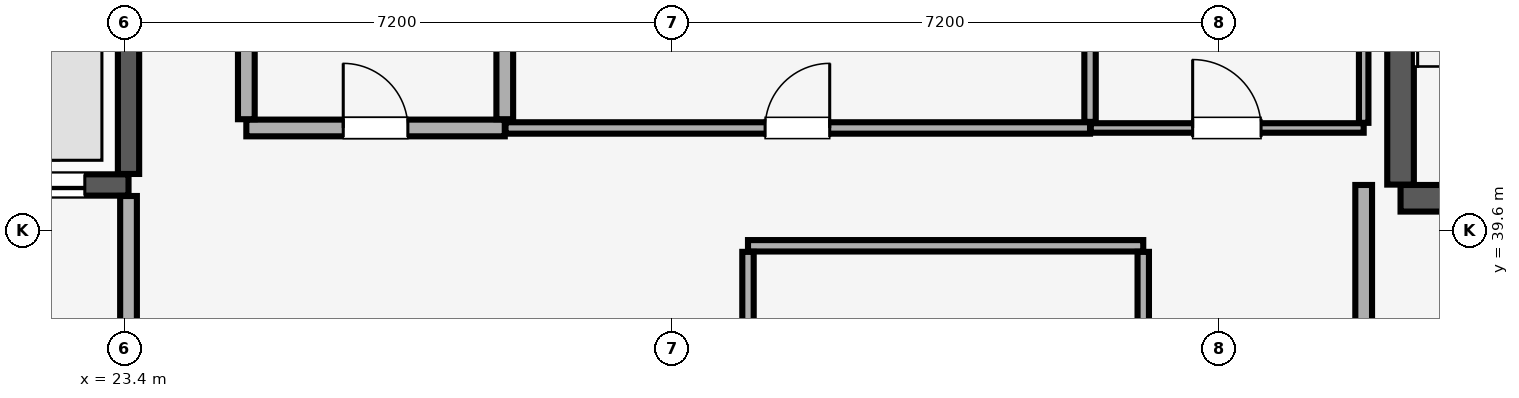
"""IFC4 building model, lengths in metres.
Left out: names, types, materials, properties, quantities, classifications, styles, units other than length and angle.
Written with IfcOpenShell. Run it as: python <this file> out.ifc"""

import sys

from ifc_helpers import new_model, si_unit, direction, frame, frame_2d, origin, place, context, subcontext, project, spatial, rectangle, extrude, element, fill, save


model = new_model("IFC4")
c1 = context("Model", 3, precision=1e-05, world=origin(), true_north=direction((0.0, 1.0)))
c2 = subcontext(c1, "Body", "Model", "MODEL_VIEW")
j1 = project(units=[si_unit("LENGTHUNIT", "METRE"), si_unit("PLANEANGLEUNIT", "RADIAN")], contexts=[c1])
p1 = place(None, origin())
s1 = spatial("IfcSite", under=j1, at=p1, CompositionType="ELEMENT")
p2 = place(p1, origin())
s2 = spatial("IfcBuilding", under=s1, at=p2, CompositionType="ELEMENT")
p3 = place(p2, frame((0.0, 0.0, 276.55)))
s3 = spatial("IfcBuildingStorey", under=s2, at=p3, CompositionType="ELEMENT", Elevation=276.55)
p4 = place(p3, frame((40.185, 40.025, 0.0), z_axis=(0.0, 0.0, 1.0), x_axis=(1.0, 0.0, 0.0)))
e1 = element("IfcWall", 1, at=p4, inside=s3, PredefinedType="SHEAR", context=c2, shape_type="SweptSolid", body=[
    extrude(rectangle(XDim=3.63, YDim=0.35, at=frame_2d((1.815, 0.0))), origin(), (0.0, 0.0, 1.0), 3.6),
])
p5 = place(p4, frame((1.24, 0.0, 0.0)))
e2 = element("IfcOpeningElement", 2, at=p5, cuts=e1, PredefinedType="OPENING", context=c2, shape_type="SweptSolid", body=[
    extrude(rectangle(XDim=1.15, YDim=2.15, at=frame_2d((0.575, 1.075))), frame((0.0, 0.185, 0.0), z_axis=(0.0, -1.0, 0.0), x_axis=(1.0, 0.0, 0.0)), (0.0, 0.0, 1.0), 0.37),
])
p6 = place(p3, frame((40.185, 40.205, 0.0), z_axis=(0.0, 0.0, 1.0), x_axis=(0.0, 1.0, 0.0)))
e3 = element("IfcWall", 3, at=p6, inside=s3, PredefinedType="SHEAR", context=c2, shape_type="SweptSolid", body=[
    extrude(rectangle(XDim=8.09, YDim=0.35, at=frame_2d((4.045, 0.0))), origin(), (0.0, 0.0, 1.0), 3.6),
])
p7 = place(p3, frame((21.035, 40.2, 0.0), z_axis=(0.0, 0.0, 1.0), x_axis=(1.0, 0.0, 0.0)))
e4 = element("IfcWall", 4, at=p7, inside=s3, PredefinedType="SHEAR", context=c2, shape_type="SweptSolid", body=[
    extrude(rectangle(XDim=2.415, YDim=0.28, at=frame_2d((1.208, 0.0))), origin(), (0.0, 0.0, 1.0), 3.6),
])
p8 = place(p7, frame((0.54, 0.0, 0.0)))
e5 = element("IfcOpeningElement", 5, at=p8, cuts=e4, PredefinedType="OPENING", context=c2, shape_type="SweptSolid", body=[
    extrude(rectangle(XDim=1.3, YDim=2.3, at=frame_2d((0.65, 1.15))), frame((0.0, 0.15, 0.0), z_axis=(0.0, -1.0, 0.0), x_axis=(1.0, 0.0, 0.0)), (0.0, 0.0, 1.0), 0.3),
])
p9 = place(p3, frame((23.45, 40.345, 0.0), z_axis=(0.0, 0.0, 1.0), x_axis=(0.0, 1.0, 0.0)))
e6 = element("IfcWall", 6, at=p9, inside=s3, PredefinedType="SHEAR", context=c2, shape_type="SweptSolid", body=[
    extrude(rectangle(XDim=2.81, YDim=0.28, at=frame_2d((1.405, 0.0))), origin(), (0.0, 0.0, 1.0), 3.6),
])
p10 = place(p3, frame((23.45, 34.415, 0.0), z_axis=(0.0, 0.0, 1.0), x_axis=(0.0, 1.0, 0.0)))
e7 = element("IfcWall", 7, at=p10, inside=s3, PredefinedType="PARTITIONING", context=c2, shape_type="SweptSolid", body=[
    extrude(rectangle(XDim=5.64, YDim=0.22, at=frame_2d((2.82, 0.0))), origin(), (0.0, 0.0, 1.0), 3.6),
])
p11 = place(p3, frame((39.7, 34.415, 0.0), z_axis=(0.0, 0.0, 1.0), x_axis=(0.0, 1.0, 0.0)))
e8 = element("IfcWall", 8, at=p11, inside=s3, PredefinedType="PARTITIONING", context=c2, shape_type="SweptSolid", body=[
    extrude(rectangle(XDim=5.785, YDim=0.22, at=frame_2d((2.893, 0.0))), origin(), (0.0, 0.0, 1.0), 3.6),
])
p12 = place(p3, frame((31.6, 39.4, 0.0), z_axis=(0.0, 0.0, 1.0), x_axis=(1.0, 0.0, 0.0)))
e9 = element("IfcWall", 9, at=p12, inside=s3, PredefinedType="PARTITIONING", context=c2, shape_type="SweptSolid", body=[
    extrude(rectangle(XDim=5.2, YDim=0.15, at=frame_2d((2.6, 0.0))), origin(), (0.0, 0.0, 1.0), 3.6),
])
for number, where, z_axis, x_axis in (
    (10, (31.6, 34.38, 0.0), (0.0, 0.0, 1.0), (0.0, 1.0, 0.0)),
    (11, (36.8, 34.38, 0.0), (0.0, 0.0, 1.0), (0.0, 1.0, 0.0)),
):
    element("IfcWall", number, at=place(p3, frame(where, z_axis=z_axis, x_axis=x_axis)), inside=s3, PredefinedType="PARTITIONING", context=c2, shape_type="SweptSolid", body=[
        extrude(rectangle(XDim=4.94, YDim=0.15, at=frame_2d((2.47, 0.0))), origin(), (0.0, 0.0, 1.0), 3.6),
    ])
p13 = place(p3, frame((25.0, 40.95, 0.0), z_axis=(0.0, 0.0, 1.0), x_axis=(1.0, 0.0, 0.0)))
e12 = element("IfcWall", 12, at=p13, inside=s3, PredefinedType="PARTITIONING", context=c2, shape_type="SweptSolid", body=[
    extrude(rectangle(XDim=3.4, YDim=0.22, at=frame_2d((1.7, 0.0))), origin(), (0.0, 0.0, 1.0), 3.6),
])
p14 = place(p13, frame((1.275, 0.0, 0.0)))
e13 = element("IfcOpeningElement", 13, at=p14, cuts=e12, PredefinedType="OPENING", context=c2, shape_type="SweptSolid", body=[
    extrude(rectangle(XDim=0.85, YDim=2.1, at=frame_2d((0.425, 1.05))), frame((0.0, 0.12, 0.0), z_axis=(0.0, -1.0, 0.0), x_axis=(1.0, 0.0, 0.0)), (0.0, 0.0, 1.0), 0.24),
])
for number, where, z_axis, x_axis in (
    (14, (25.0, 41.065, 0.0), (0.0, 0.0, 1.0), (0.0, 1.0, 0.0)),
    (15, (28.4, 41.065, 0.0), (0.0, 0.0, 1.0), (0.0, 1.0, 0.0)),
):
    element("IfcWall", number, at=place(p3, frame(where, z_axis=z_axis, x_axis=x_axis)), inside=s3, PredefinedType="PARTITIONING", context=c2, shape_type="SweptSolid", body=[
        extrude(rectangle(XDim=7.785, YDim=0.22, at=frame_2d((3.893, 0.0))), origin(), (0.0, 0.0, 1.0), 3.6),
    ])
p15 = place(p3, frame((28.41, 40.95, 0.0), z_axis=(0.0, 0.0, 1.0), x_axis=(1.0, 0.0, 0.0)))
e16 = element("IfcWall", 16, at=p15, inside=s3, PredefinedType="PARTITIONING", context=c2, shape_type="SweptSolid", body=[
    extrude(rectangle(XDim=7.69, YDim=0.15, at=frame_2d((3.845, 0.0))), origin(), (0.0, 0.0, 1.0), 3.6),
])
p16 = place(p15, frame((3.415, 0.0, 0.0)))
e17 = element("IfcOpeningElement", 17, at=p16, cuts=e16, PredefinedType="OPENING", context=c2, shape_type="SweptSolid", body=[
    extrude(rectangle(XDim=0.85, YDim=2.1, at=frame_2d((0.425, 1.05))), frame((0.0, 0.085, 0.0), z_axis=(0.0, -1.0, 0.0), x_axis=(1.0, 0.0, 0.0)), (0.0, 0.0, 1.0), 0.17),
])
p17 = place(p3, frame((36.1, 41.03, 0.0), z_axis=(0.0, 0.0, 1.0), x_axis=(0.0, 1.0, 0.0)))
e18 = element("IfcWall", 18, at=p17, inside=s3, PredefinedType="PARTITIONING", context=c2, shape_type="SweptSolid", body=[
    extrude(rectangle(XDim=7.82, YDim=0.15, at=frame_2d((3.91, 0.0))), origin(), (0.0, 0.0, 1.0), 3.6),
])
p18 = place(p3, frame((36.11, 40.95, 0.0), z_axis=(0.0, 0.0, 1.0), x_axis=(1.0, 0.0, 0.0)))
e19 = element("IfcWall", 19, at=p18, inside=s3, PredefinedType="PARTITIONING", context=c2, shape_type="SweptSolid", body=[
    extrude(rectangle(XDim=3.59, YDim=0.125, at=frame_2d((1.795, 0.0))), origin(), (0.0, 0.0, 1.0), 3.6),
])
p19 = place(p18, frame((1.34, 0.0, 0.0)))
e20 = element("IfcOpeningElement", 20, at=p19, cuts=e19, PredefinedType="OPENING", context=c2, shape_type="SweptSolid", body=[
    extrude(rectangle(XDim=0.9, YDim=2.1, at=frame_2d((0.45, 1.05))), frame((0.0, 0.073, 0.0), z_axis=(0.0, -1.0, 0.0), x_axis=(1.0, 0.0, 0.0)), (0.0, 0.0, 1.0), 0.145),
])
p20 = place(p3, frame((39.7, 41.018, 0.0), z_axis=(0.0, 0.0, 1.0), x_axis=(0.0, 1.0, 0.0)))
e21 = element("IfcWall", 21, at=p20, inside=s3, PredefinedType="PARTITIONING", context=c2, shape_type="SweptSolid", body=[
    extrude(rectangle(XDim=3.715, YDim=0.125, at=frame_2d((1.857, 0.0))), origin(), (0.0, 0.0, 1.0), 3.6),
])
p21 = place(p8, origin())
e22 = element("IfcDoor", 22, at=p21, inside=s3, OperationType="DOUBLE_DOOR_SLIDING", PredefinedType="DOOR", context=c2, shape_type="SweptSolid", body=[
    extrude(rectangle(XDim=1.3, YDim=2.3, at=frame_2d((0.65, 1.15))), frame((0.0, 0.025, 0.0), z_axis=(0.0, -1.0, 0.0), x_axis=(1.0, 0.0, 0.0)), (0.0, 0.0, 1.0), 0.05),
])
fill(e5, e22)
p22 = place(p14, origin())
e23 = element("IfcDoor", 23, at=p22, inside=s3, OperationType="SINGLE_SWING_LEFT", PredefinedType="DOOR", context=c2, shape_type="SweptSolid", body=[
    extrude(rectangle(XDim=0.85, YDim=2.1, at=frame_2d((0.425, 1.05))), frame((0.0, 0.025, 0.0), z_axis=(0.0, -1.0, 0.0), x_axis=(1.0, 0.0, 0.0)), (0.0, 0.0, 1.0), 0.05),
])
fill(e13, e23)
p23 = place(p16, origin())
e24 = element("IfcDoor", 24, at=p23, inside=s3, OperationType="SINGLE_SWING_RIGHT", PredefinedType="DOOR", context=c2, shape_type="SweptSolid", body=[
    extrude(rectangle(XDim=0.85, YDim=2.1, at=frame_2d((0.425, 1.05))), frame((0.0, 0.025, 0.0), z_axis=(0.0, -1.0, 0.0), x_axis=(1.0, 0.0, 0.0)), (0.0, 0.0, 1.0), 0.05),
])
fill(e17, e24)
p24 = place(p19, origin())
e25 = element("IfcDoor", 25, at=p24, inside=s3, OperationType="SINGLE_SWING_LEFT", PredefinedType="DOOR", context=c2, shape_type="SweptSolid", body=[
    extrude(rectangle(XDim=0.9, YDim=2.1, at=frame_2d((0.45, 1.05))), frame((0.0, 0.025, 0.0), z_axis=(0.0, -1.0, 0.0), x_axis=(1.0, 0.0, 0.0)), (0.0, 0.0, 1.0), 0.05),
])
fill(e20, e25)
save(model, sys.argv[1])
